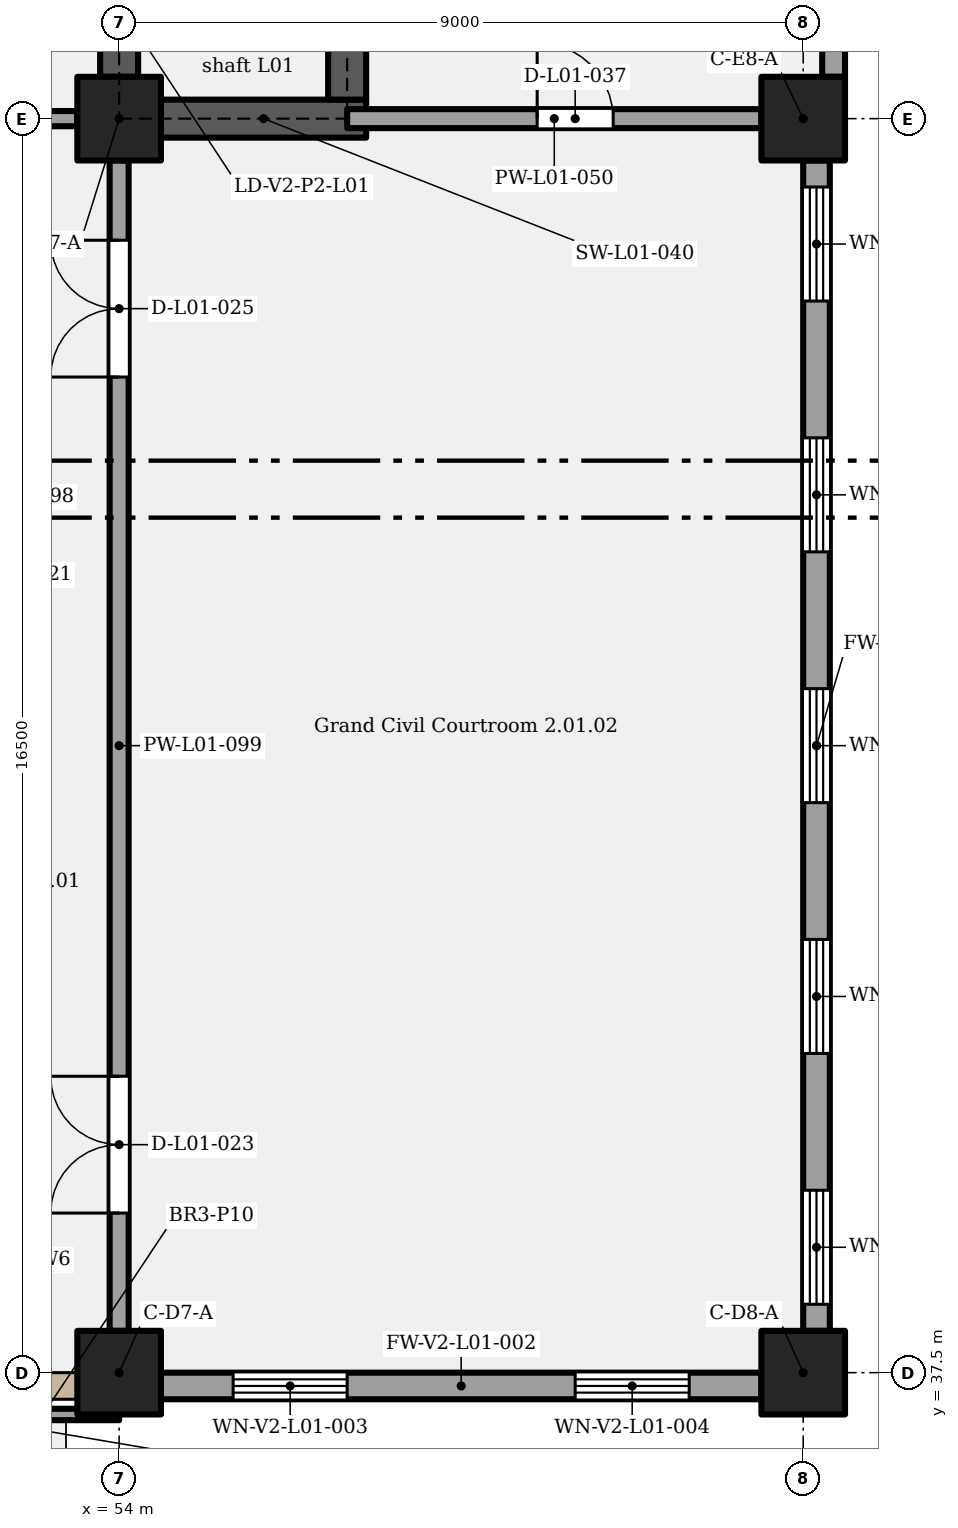
"""IFC4 building model, lengths in metres.
Left out: names, types, materials, properties, quantities, classifications, styles, units other than length and angle.
Written with IfcOpenShell. Run it as: python <this file> out.ifc"""

import sys

from ifc_helpers import new_model, si_unit, direction, frame, frame_2d, origin, origin_2d, place, context, subcontext, project, spatial, rectangle, extrude, element, fill, save


model = new_model("IFC4")
c1 = context("Model", 3, precision=1e-05, world=origin(), true_north=direction((0.0, 1.0)))
c2 = subcontext(c1, "Body", "Model", "MODEL_VIEW")
j1 = project(units=[si_unit("LENGTHUNIT", "METRE"), si_unit("PLANEANGLEUNIT", "RADIAN")], contexts=[c1])
p1 = place(None, origin())
s1 = spatial("IfcSite", under=j1, at=p1, CompositionType="ELEMENT")
p2 = place(p1, origin())
s2 = spatial("IfcBuilding", under=s1, at=p2, CompositionType="ELEMENT")
p3 = place(p2, frame((0.0, 0.0, 6.6)))
s3 = spatial("IfcBuildingStorey", under=s2, at=p3, CompositionType="ELEMENT", Elevation=6.6)
for number, where, z_axis, x_axis in (
    (1, (54.0, 37.5, 0.0), (0.0, 0.0, 1.0), (1.0, 0.0, 0.0)),
    (2, (63.0, 37.5, 0.0), (0.0, 0.0, 1.0), (1.0, 0.0, 0.0)),
    (3, (54.0, 54.0, 0.0), (0.0, 0.0, 1.0), (1.0, 0.0, 0.0)),
    (4, (63.0, 54.0, 0.0), (0.0, 0.0, 1.0), (1.0, 0.0, 0.0)),
):
    element("IfcColumn", number, at=place(p3, frame(where, z_axis=z_axis, x_axis=x_axis)), inside=s3, PredefinedType="COLUMN", context=c2, shape_type="SweptSolid", body=[
        extrude(rectangle(XDim=1.1, YDim=1.1, at=origin_2d()), origin(), (0.0, 0.0, 1.0), 5.4),
    ])
p4 = place(p3, frame((54.55, 54.0, 0.0), z_axis=(0.0, 0.0, 1.0), x_axis=(1.0, 0.0, 0.0)))
e5 = element("IfcWall", 5, at=p4, inside=s3, PredefinedType="SHEAR", context=c2, shape_type="SweptSolid", body=[
    extrude(rectangle(XDim=2.7, YDim=0.5, at=frame_2d((1.35, 0.0))), origin(), (0.0, 0.0, 1.0), 5.1),
])
p5 = place(p3, frame((57.0, 54.25, 0.0), z_axis=(0.0, 0.0, 1.0), x_axis=(0.0, 1.0, 0.0)))
e6 = element("IfcWall", 6, at=p5, inside=s3, PredefinedType="SHEAR", context=c2, shape_type="SweptSolid", body=[
    extrude(rectangle(XDim=2.5, YDim=0.5, at=frame_2d((1.25, 0.0))), origin(), (0.0, 0.0, 1.0), 5.1),
])
p6 = place(p3, frame((54.0, 54.55, 0.0), z_axis=(0.0, 0.0, 1.0), x_axis=(0.0, 1.0, 0.0)))
e7 = element("IfcWall", 7, at=p6, inside=s3, PredefinedType="SHEAR", context=c2, shape_type="SweptSolid", body=[
    extrude(rectangle(XDim=11.0, YDim=0.5, at=frame_2d((5.5, 0.0))), origin(), (0.0, 0.0, 1.0), 5.1),
])
p7 = place(p6, frame((0.4, 0.0, 0.0)))
e8 = element("IfcOpeningElement", 8, at=p7, cuts=e7, PredefinedType="OPENING", context=c2, shape_type="SweptSolid", body=[
    extrude(rectangle(XDim=1.1, YDim=2.1, at=frame_2d((0.55, 1.05))), frame((0.0, 0.26, 0.0), z_axis=(0.0, -1.0, 0.0), x_axis=(1.0, 0.0, 0.0)), (0.0, 0.0, 1.0), 0.52),
])
p8 = place(p6, frame((2.85, 0.0, 0.0)))
e9 = element("IfcOpeningElement", 9, at=p8, cuts=e7, PredefinedType="OPENING", context=c2, shape_type="SweptSolid", body=[
    extrude(rectangle(XDim=1.2, YDim=2.1, at=frame_2d((0.6, 1.05))), frame((0.0, 0.26, 0.0), z_axis=(0.0, -1.0, 0.0), x_axis=(1.0, 0.0, 0.0)), (0.0, 0.0, 1.0), 0.52),
])
p9 = place(p3, frame((54.55, 37.325, 0.0), z_axis=(0.0, 0.0, 1.0), x_axis=(1.0, 0.0, 0.0)))
e10 = element("IfcWall", 10, at=p9, inside=s3, PredefinedType="SOLIDWALL", context=c2, shape_type="SweptSolid", body=[
    extrude(rectangle(XDim=7.9, YDim=0.35, at=frame_2d((3.95, 0.0))), origin(), (0.0, 0.0, 1.0), 5.4),
])
p10 = place(p9, frame((0.95, 0.0, 1.05)))
e11 = element("IfcOpeningElement", 11, at=p10, cuts=e10, PredefinedType="OPENING", context=c2, shape_type="SweptSolid", body=[
    extrude(rectangle(XDim=1.5, YDim=3.75, at=frame_2d((0.75, 1.875))), frame((0.0, 0.185, 0.0), z_axis=(0.0, -1.0, 0.0), x_axis=(1.0, 0.0, 0.0)), (0.0, 0.0, 1.0), 0.37),
])
p11 = place(p9, frame((5.45, 0.0, 1.05)))
e12 = element("IfcOpeningElement", 12, at=p11, cuts=e10, PredefinedType="OPENING", context=c2, shape_type="SweptSolid", body=[
    extrude(rectangle(XDim=1.5, YDim=3.75, at=frame_2d((0.75, 1.875))), frame((0.0, 0.185, 0.0), z_axis=(0.0, -1.0, 0.0), x_axis=(1.0, 0.0, 0.0)), (0.0, 0.0, 1.0), 0.37),
])
p12 = place(p3, frame((63.175, 38.05, 0.0), z_axis=(0.0, 0.0, 1.0), x_axis=(0.0, 1.0, 0.0)))
e13 = element("IfcWall", 13, at=p12, inside=s3, PredefinedType="SOLIDWALL", context=c2, shape_type="SweptSolid", body=[
    extrude(rectangle(XDim=15.4, YDim=0.35, at=frame_2d((7.7, 0.0))), origin(), (0.0, 0.0, 1.0), 5.4),
])
p13 = place(p12, frame((0.35, 0.0, 1.05)))
e14 = element("IfcOpeningElement", 14, at=p13, cuts=e13, PredefinedType="OPENING", context=c2, shape_type="SweptSolid", body=[
    extrude(rectangle(XDim=1.5, YDim=3.75, at=frame_2d((0.75, 1.875))), frame((0.0, 0.185, 0.0), z_axis=(0.0, -1.0, 0.0), x_axis=(1.0, 0.0, 0.0)), (0.0, 0.0, 1.0), 0.37),
])
p14 = place(p12, frame((3.65, 0.0, 1.05)))
e15 = element("IfcOpeningElement", 15, at=p14, cuts=e13, PredefinedType="OPENING", context=c2, shape_type="SweptSolid", body=[
    extrude(rectangle(XDim=1.5, YDim=3.75, at=frame_2d((0.75, 1.875))), frame((0.0, 0.185, 0.0), z_axis=(0.0, -1.0, 0.0), x_axis=(1.0, 0.0, 0.0)), (0.0, 0.0, 1.0), 0.37),
])
p15 = place(p12, frame((6.95, 0.0, 1.05)))
e16 = element("IfcOpeningElement", 16, at=p15, cuts=e13, PredefinedType="OPENING", context=c2, shape_type="SweptSolid", body=[
    extrude(rectangle(XDim=1.5, YDim=3.75, at=frame_2d((0.75, 1.875))), frame((0.0, 0.185, 0.0), z_axis=(0.0, -1.0, 0.0), x_axis=(1.0, 0.0, 0.0)), (0.0, 0.0, 1.0), 0.37),
])
p16 = place(p12, frame((10.25, 0.0, 1.05)))
e17 = element("IfcOpeningElement", 17, at=p16, cuts=e13, PredefinedType="OPENING", context=c2, shape_type="SweptSolid", body=[
    extrude(rectangle(XDim=1.5, YDim=3.75, at=frame_2d((0.75, 1.875))), frame((0.0, 0.185, 0.0), z_axis=(0.0, -1.0, 0.0), x_axis=(1.0, 0.0, 0.0)), (0.0, 0.0, 1.0), 0.37),
])
p17 = place(p12, frame((13.55, 0.0, 1.05)))
e18 = element("IfcOpeningElement", 18, at=p17, cuts=e13, PredefinedType="OPENING", context=c2, shape_type="SweptSolid", body=[
    extrude(rectangle(XDim=1.5, YDim=3.75, at=frame_2d((0.75, 1.875))), frame((0.0, 0.185, 0.0), z_axis=(0.0, -1.0, 0.0), x_axis=(1.0, 0.0, 0.0)), (0.0, 0.0, 1.0), 0.37),
])
p18 = place(p3, frame((63.4, 54.55, 0.0), z_axis=(0.0, 0.0, 1.0), x_axis=(0.0, 1.0, 0.0)))
e19 = element("IfcWall", 19, at=p18, inside=s3, PredefinedType="SOLIDWALL", context=c2, shape_type="SweptSolid", body=[
    extrude(rectangle(XDim=2.45, YDim=0.3, at=frame_2d((1.225, 0.0))), origin(), (0.0, 0.0, 1.0), 5.1),
])
p19 = place(p18, frame((0.425, 0.0, 1.05)))
e20 = element("IfcOpeningElement", 20, at=p19, cuts=e19, PredefinedType="OPENING", context=c2, shape_type="SweptSolid", body=[
    extrude(rectangle(XDim=1.05, YDim=2.4, at=frame_2d((0.525, 1.2))), frame((0.0, 0.16, 0.0), z_axis=(0.0, -1.0, 0.0), x_axis=(1.0, 0.0, 0.0)), (0.0, 0.0, 1.0), 0.32),
])
p20 = place(p3, frame((49.5, 36.95, 0.0), z_axis=(0.0, 0.0, 1.0), x_axis=(1.0, 0.0, 0.0)))
e21 = element("IfcWall", 21, at=p20, inside=s3, PredefinedType="PARTITIONING", context=c2, shape_type="SweptSolid", body=[
    extrude(rectangle(XDim=4.5, YDim=0.15, at=frame_2d((2.25, 0.0))), origin(), (0.0, 0.0, 1.0), 3.3),
])
p21 = place(p20, frame((2.4, 0.0, 0.0), z_axis=(0.0, 0.0, 1.0), x_axis=(-1.0, 0.0, 0.0)))
e22 = element("IfcOpeningElement", 22, at=p21, cuts=e21, PredefinedType="OPENING", context=c2, shape_type="SweptSolid", body=[
    extrude(rectangle(XDim=1.8, YDim=2.4, at=frame_2d((0.9, 1.2))), frame((0.0, 0.085, 0.0), z_axis=(0.0, -1.0, 0.0), x_axis=(1.0, 0.0, 0.0)), (0.0, 0.0, 1.0), 0.17),
])
p22 = place(p3, frame((49.5, 54.0, 0.0), z_axis=(0.0, 0.0, 1.0), x_axis=(1.0, 0.0, 0.0)))
e23 = element("IfcWall", 23, at=p22, inside=s3, PredefinedType="PARTITIONING", context=c2, shape_type="SweptSolid", body=[
    extrude(rectangle(XDim=3.95, YDim=0.2, at=frame_2d((1.975, 0.0))), origin(), (0.0, 0.0, 1.0), 4.35),
])
p23 = place(p22, frame((1.35, 0.0, 0.0)))
e24 = element("IfcOpeningElement", 24, at=p23, cuts=e23, PredefinedType="OPENING", context=c2, shape_type="SweptSolid", body=[
    extrude(rectangle(XDim=1.8, YDim=2.1, at=frame_2d((0.9, 1.05))), frame((0.0, 0.11, 0.0), z_axis=(0.0, -1.0, 0.0), x_axis=(1.0, 0.0, 0.0)), (0.0, 0.0, 1.0), 0.22),
])
p24 = place(p3, frame((57.0, 54.0, 0.0), z_axis=(0.0, 0.0, 1.0), x_axis=(1.0, 0.0, 0.0)))
e25 = element("IfcWall", 25, at=p24, inside=s3, PredefinedType="PARTITIONING", context=c2, shape_type="SweptSolid", body=[
    extrude(rectangle(XDim=5.45, YDim=0.25, at=frame_2d((2.725, 0.0))), origin(), (0.0, 0.0, 1.0), 4.35),
])
p25 = place(p24, frame((2.5, 0.0, 0.0)))
e26 = element("IfcOpeningElement", 26, at=p25, cuts=e25, PredefinedType="OPENING", context=c2, shape_type="SweptSolid", body=[
    extrude(rectangle(XDim=1.0, YDim=2.1, at=frame_2d((0.5, 1.05))), frame((0.0, 0.135, 0.0), z_axis=(0.0, -1.0, 0.0), x_axis=(1.0, 0.0, 0.0)), (0.0, 0.0, 1.0), 0.27),
])
p26 = place(p3, frame((54.0, 38.05, 0.0), z_axis=(0.0, 0.0, 1.0), x_axis=(0.0, 1.0, 0.0)))
e27 = element("IfcWall", 27, at=p26, inside=s3, PredefinedType="PARTITIONING", context=c2, shape_type="SweptSolid", body=[
    extrude(rectangle(XDim=15.4, YDim=0.25, at=frame_2d((7.7, 0.0))), origin(), (0.0, 0.0, 1.0), 4.15),
])
p27 = place(p26, frame((1.55, 0.0, 0.0)))
e28 = element("IfcOpeningElement", 28, at=p27, cuts=e27, PredefinedType="OPENING", context=c2, shape_type="SweptSolid", body=[
    extrude(rectangle(XDim=1.8, YDim=2.4, at=frame_2d((0.9, 1.2))), frame((0.0, 0.135, 0.0), z_axis=(0.0, -1.0, 0.0), x_axis=(1.0, 0.0, 0.0)), (0.0, 0.0, 1.0), 0.27),
])
p28 = place(p26, frame((12.55, 0.0, 0.0)))
e29 = element("IfcOpeningElement", 29, at=p28, cuts=e27, PredefinedType="OPENING", context=c2, shape_type="SweptSolid", body=[
    extrude(rectangle(XDim=1.8, YDim=2.4, at=frame_2d((0.9, 1.2))), frame((0.0, 0.135, 0.0), z_axis=(0.0, -1.0, 0.0), x_axis=(1.0, 0.0, 0.0)), (0.0, 0.0, 1.0), 0.27),
])
p29 = place(p10, origin())
e30 = element("IfcWindow", 30, at=p29, inside=s3, PartitioningType="SINGLE_PANEL", PredefinedType="WINDOW", context=c2, shape_type="SweptSolid", body=[
    extrude(rectangle(XDim=1.5, YDim=3.75, at=frame_2d((0.75, 1.875))), frame((0.0, 0.03, 0.0), z_axis=(0.0, -1.0, 0.0), x_axis=(1.0, 0.0, 0.0)), (0.0, 0.0, 1.0), 0.06),
])
fill(e11, e30)
p30 = place(p11, origin())
e31 = element("IfcWindow", 31, at=p30, inside=s3, PartitioningType="SINGLE_PANEL", PredefinedType="WINDOW", context=c2, shape_type="SweptSolid", body=[
    extrude(rectangle(XDim=1.5, YDim=3.75, at=frame_2d((0.75, 1.875))), frame((0.0, 0.03, 0.0), z_axis=(0.0, -1.0, 0.0), x_axis=(1.0, 0.0, 0.0)), (0.0, 0.0, 1.0), 0.06),
])
fill(e12, e31)
p31 = place(p13, origin())
e32 = element("IfcWindow", 32, at=p31, inside=s3, PartitioningType="SINGLE_PANEL", PredefinedType="WINDOW", context=c2, shape_type="SweptSolid", body=[
    extrude(rectangle(XDim=1.5, YDim=3.75, at=frame_2d((0.75, 1.875))), frame((0.0, 0.03, 0.0), z_axis=(0.0, -1.0, 0.0), x_axis=(1.0, 0.0, 0.0)), (0.0, 0.0, 1.0), 0.06),
])
fill(e14, e32)
p32 = place(p14, origin())
e33 = element("IfcWindow", 33, at=p32, inside=s3, PartitioningType="SINGLE_PANEL", PredefinedType="WINDOW", context=c2, shape_type="SweptSolid", body=[
    extrude(rectangle(XDim=1.5, YDim=3.75, at=frame_2d((0.75, 1.875))), frame((0.0, 0.03, 0.0), z_axis=(0.0, -1.0, 0.0), x_axis=(1.0, 0.0, 0.0)), (0.0, 0.0, 1.0), 0.06),
])
fill(e15, e33)
p33 = place(p15, origin())
e34 = element("IfcWindow", 34, at=p33, inside=s3, PartitioningType="SINGLE_PANEL", PredefinedType="WINDOW", context=c2, shape_type="SweptSolid", body=[
    extrude(rectangle(XDim=1.5, YDim=3.75, at=frame_2d((0.75, 1.875))), frame((0.0, 0.03, 0.0), z_axis=(0.0, -1.0, 0.0), x_axis=(1.0, 0.0, 0.0)), (0.0, 0.0, 1.0), 0.06),
])
fill(e16, e34)
p34 = place(p16, origin())
e35 = element("IfcWindow", 35, at=p34, inside=s3, PartitioningType="SINGLE_PANEL", PredefinedType="WINDOW", context=c2, shape_type="SweptSolid", body=[
    extrude(rectangle(XDim=1.5, YDim=3.75, at=frame_2d((0.75, 1.875))), frame((0.0, 0.03, 0.0), z_axis=(0.0, -1.0, 0.0), x_axis=(1.0, 0.0, 0.0)), (0.0, 0.0, 1.0), 0.06),
])
fill(e17, e35)
p35 = place(p17, origin())
e36 = element("IfcWindow", 36, at=p35, inside=s3, PartitioningType="SINGLE_PANEL", PredefinedType="WINDOW", context=c2, shape_type="SweptSolid", body=[
    extrude(rectangle(XDim=1.5, YDim=3.75, at=frame_2d((0.75, 1.875))), frame((0.0, 0.03, 0.0), z_axis=(0.0, -1.0, 0.0), x_axis=(1.0, 0.0, 0.0)), (0.0, 0.0, 1.0), 0.06),
])
fill(e18, e36)
p36 = place(p27, origin())
e37 = element("IfcDoor", 37, at=p36, inside=s3, OperationType="DOUBLE_DOOR_SINGLE_SWING", PredefinedType="DOOR", context=c2, shape_type="SweptSolid", body=[
    extrude(rectangle(XDim=1.8, YDim=2.4, at=frame_2d((0.9, 1.2))), frame((0.0, 0.025, 0.0), z_axis=(0.0, -1.0, 0.0), x_axis=(1.0, 0.0, 0.0)), (0.0, 0.0, 1.0), 0.05),
])
fill(e28, e37)
p37 = place(p28, origin())
e38 = element("IfcDoor", 38, at=p37, inside=s3, OperationType="DOUBLE_DOOR_SINGLE_SWING", PredefinedType="DOOR", context=c2, shape_type="SweptSolid", body=[
    extrude(rectangle(XDim=1.8, YDim=2.4, at=frame_2d((0.9, 1.2))), frame((0.0, 0.025, 0.0), z_axis=(0.0, -1.0, 0.0), x_axis=(1.0, 0.0, 0.0)), (0.0, 0.0, 1.0), 0.05),
])
fill(e29, e38)
p38 = place(p25, origin())
e39 = element("IfcDoor", 39, at=p38, inside=s3, OperationType="SINGLE_SWING_LEFT", PredefinedType="DOOR", context=c2, shape_type="SweptSolid", body=[
    extrude(rectangle(XDim=1.0, YDim=2.1, at=frame_2d((0.5, 1.05))), frame((0.0, 0.025, 0.0), z_axis=(0.0, -1.0, 0.0), x_axis=(1.0, 0.0, 0.0)), (0.0, 0.0, 1.0), 0.05),
])
fill(e26, e39)
save(model, sys.argv[1])
